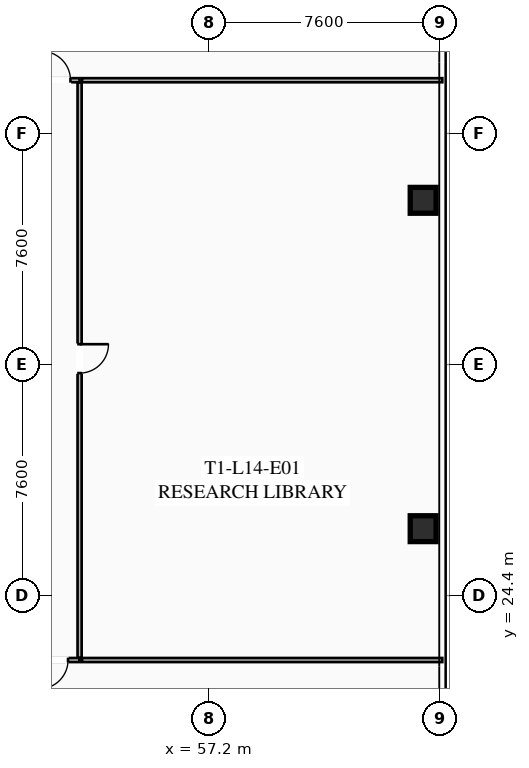
"""IFC4 building model, lengths in metres.
Left out: names, types, materials, properties, quantities, classifications, styles, units other than length and angle.
Written with IfcOpenShell. Run it as: python <this file> out.ifc"""

import sys

from ifc_helpers import new_model, si_unit, direction, frame, frame_2d, origin, origin_2d, place, context, subcontext, project, spatial, rectangle, hollow_rectangle, extrude, element, fill, save


model = new_model("IFC4")
c1 = context("Model", 3, precision=1e-05, world=origin(), true_north=direction((0.0, 1.0)))
c2 = subcontext(c1, "Body", "Model", "MODEL_VIEW")
j1 = project(units=[si_unit("LENGTHUNIT", "METRE"), si_unit("PLANEANGLEUNIT", "RADIAN")], contexts=[c1])
p1 = place(None, origin())
s1 = spatial("IfcSite", under=j1, at=p1, CompositionType="ELEMENT")
p2 = place(p1, origin())
s2 = spatial("IfcBuilding", under=s1, at=p2, CompositionType="ELEMENT")
p3 = place(p2, frame((0.0, 0.0, 56.55)))
s3 = spatial("IfcBuildingStorey", under=s2, at=p3, CompositionType="ELEMENT", Elevation=56.55)
for number, where, z_axis, x_axis in (
    (1, (64.25, 26.6, 0.0), (0.0, 0.0, 1.0), (1.0, 0.0, 0.0)),
    (2, (64.25, 37.4, 0.0), (0.0, 0.0, 1.0), (1.0, 0.0, 0.0)),
):
    element("IfcColumn", number, at=place(p3, frame(where, z_axis=z_axis, x_axis=x_axis)), inside=s3, PredefinedType="COLUMN", context=c2, shape_type="SweptSolid", body=[
        extrude(hollow_rectangle(XDim=0.85, YDim=0.85, WallThickness=0.035, at=origin_2d()), origin(), (0.0, 0.0, 1.0), 3.35),
    ])
p4 = place(p3, frame((22.35, 41.35, 0.0), z_axis=(0.0, 0.0, 1.0), x_axis=(1.0, 0.0, 0.0)))
e3 = element("IfcWall", 3, at=p4, inside=s3, PredefinedType="PARTITIONING", context=c2, shape_type="SweptSolid", body=[
    extrude(rectangle(XDim=30.6, YDim=0.135, at=frame_2d((15.3, 0.0))), origin(), (0.0, 0.0, 1.0), 2.703),
])
p5 = place(p4, frame((0.3, 0.0, 0.0)))
e4 = element("IfcOpeningElement", 4, at=p5, cuts=e3, PredefinedType="OPENING", context=c2, shape_type="SweptSolid", body=[
    extrude(rectangle(XDim=0.95, YDim=2.05, at=frame_2d((0.475, 1.025))), frame((0.0, 0.077, 0.0), z_axis=(0.0, -1.0, 0.0), x_axis=(1.0, 0.0, 0.0)), (0.0, 0.0, 1.0), 0.155),
])
p6 = place(p4, frame((15.12, 0.0, 0.0)))
e5 = element("IfcOpeningElement", 5, at=p6, cuts=e3, PredefinedType="OPENING", context=c2, shape_type="SweptSolid", body=[
    extrude(rectangle(XDim=0.95, YDim=2.05, at=frame_2d((0.475, 1.025))), frame((0.0, 0.077, 0.0), z_axis=(0.0, -1.0, 0.0), x_axis=(1.0, 0.0, 0.0)), (0.0, 0.0, 1.0), 0.155),
])
p7 = place(p4, frame((19.423, 0.0, 0.0)))
e6 = element("IfcOpeningElement", 6, at=p7, cuts=e3, PredefinedType="OPENING", context=c2, shape_type="SweptSolid", body=[
    extrude(rectangle(XDim=0.95, YDim=2.05, at=frame_2d((0.475, 1.025))), frame((0.0, 0.077, 0.0), z_axis=(0.0, -1.0, 0.0), x_axis=(1.0, 0.0, 0.0)), (0.0, 0.0, 1.0), 0.155),
])
p8 = place(p4, frame((23.228, 0.0, 0.0)))
e7 = element("IfcOpeningElement", 7, at=p8, cuts=e3, PredefinedType="OPENING", context=c2, shape_type="SweptSolid", body=[
    extrude(rectangle(XDim=0.95, YDim=2.05, at=frame_2d((0.475, 1.025))), frame((0.0, 0.077, 0.0), z_axis=(0.0, -1.0, 0.0), x_axis=(1.0, 0.0, 0.0)), (0.0, 0.0, 1.0), 0.155),
])
p9 = place(p4, frame((29.35, 0.0, 0.0)))
e8 = element("IfcOpeningElement", 8, at=p9, cuts=e3, PredefinedType="OPENING", context=c2, shape_type="SweptSolid", body=[
    extrude(rectangle(XDim=0.95, YDim=2.05, at=frame_2d((0.475, 1.025))), frame((0.0, 0.077, 0.0), z_axis=(0.0, -1.0, 0.0), x_axis=(1.0, 0.0, 0.0)), (0.0, 0.0, 1.0), 0.155),
])
p10 = place(p3, frame((52.95, 22.28, 0.0), z_axis=(0.0, 0.0, 1.0), x_axis=(-1.0, 0.0, 0.0)))
e9 = element("IfcWall", 9, at=p10, inside=s3, PredefinedType="PARTITIONING", context=c2, shape_type="SweptSolid", body=[
    extrude(rectangle(XDim=30.6, YDim=0.135, at=frame_2d((15.3, 0.0))), origin(), (0.0, 0.0, 1.0), 2.703),
])
p11 = place(p10, frame((29.27, 0.0, 0.0)))
e10 = element("IfcOpeningElement", 10, at=p11, cuts=e9, PredefinedType="OPENING", context=c2, shape_type="SweptSolid", body=[
    extrude(rectangle(XDim=0.95, YDim=2.05, at=frame_2d((0.475, 1.025))), frame((0.0, 0.077, 0.0), z_axis=(0.0, -1.0, 0.0), x_axis=(1.0, 0.0, 0.0)), (0.0, 0.0, 1.0), 0.155),
])
p12 = place(p10, frame((10.268, 0.0, 0.0)))
e11 = element("IfcOpeningElement", 11, at=p12, cuts=e9, PredefinedType="OPENING", context=c2, shape_type="SweptSolid", body=[
    extrude(rectangle(XDim=0.95, YDim=2.05, at=frame_2d((0.475, 1.025))), frame((0.0, 0.077, 0.0), z_axis=(0.0, -1.0, 0.0), x_axis=(1.0, 0.0, 0.0)), (0.0, 0.0, 1.0), 0.155),
])
p13 = place(p10, frame((0.38, 0.0, 0.0)))
e12 = element("IfcOpeningElement", 12, at=p13, cuts=e9, PredefinedType="OPENING", context=c2, shape_type="SweptSolid", body=[
    extrude(rectangle(XDim=0.95, YDim=2.05, at=frame_2d((0.475, 1.025))), frame((0.0, 0.077, 0.0), z_axis=(0.0, -1.0, 0.0), x_axis=(1.0, 0.0, 0.0)), (0.0, 0.0, 1.0), 0.155),
])
p14 = place(p3, frame((52.95, 41.27, 0.0), z_axis=(0.0, 0.0, 1.0), x_axis=(0.0, -1.0, 0.0)))
e13 = element("IfcWall", 13, at=p14, inside=s3, PredefinedType="PARTITIONING", context=c2, shape_type="SweptSolid", body=[
    extrude(rectangle(XDim=18.91, YDim=0.135, at=frame_2d((9.455, 0.0))), origin(), (0.0, 0.0, 1.0), 2.703),
])
p15 = place(p14, frame((8.603, 0.0, 0.0)))
e14 = element("IfcOpeningElement", 14, at=p15, cuts=e13, PredefinedType="OPENING", context=c2, shape_type="SweptSolid", body=[
    extrude(rectangle(XDim=0.95, YDim=2.05, at=frame_2d((0.475, 1.025))), frame((0.0, 0.077, 0.0), z_axis=(0.0, -1.0, 0.0), x_axis=(1.0, 0.0, 0.0)), (0.0, 0.0, 1.0), 0.155),
])
for number, where, z_axis, x_axis in (
    (15, (64.88, 41.35, 0.0), (0.0, 0.0, 1.0), (-1.0, 0.0, 0.0)),
    (16, (53.03, 22.28, 0.0), (0.0, 0.0, 1.0), (1.0, 0.0, 0.0)),
):
    element("IfcWall", number, at=place(p3, frame(where, z_axis=z_axis, x_axis=x_axis)), inside=s3, PredefinedType="PARTITIONING", context=c2, shape_type="SweptSolid", body=[
        extrude(rectangle(XDim=11.85, YDim=0.135, at=frame_2d((5.925, 0.0))), origin(), (0.0, 0.0, 1.0), 2.703),
    ])
p16 = place(p9, origin())
e17 = element("IfcDoor", 17, at=p16, inside=s3, OperationType="SINGLE_SWING_LEFT", PredefinedType="DOOR", context=c2, shape_type="SweptSolid", body=[
    extrude(rectangle(XDim=0.95, YDim=2.05, at=frame_2d((0.475, 1.025))), frame((0.0, 0.025, 0.0), z_axis=(0.0, -1.0, 0.0), x_axis=(1.0, 0.0, 0.0)), (0.0, 0.0, 1.0), 0.05),
])
fill(e8, e17)
p17 = place(p13, origin())
e18 = element("IfcDoor", 18, at=p17, inside=s3, OperationType="SINGLE_SWING_RIGHT", PredefinedType="DOOR", context=c2, shape_type="SweptSolid", body=[
    extrude(rectangle(XDim=0.95, YDim=2.05, at=frame_2d((0.475, 1.025))), frame((0.0, 0.025, 0.0), z_axis=(0.0, -1.0, 0.0), x_axis=(1.0, 0.0, 0.0)), (0.0, 0.0, 1.0), 0.05),
])
fill(e12, e18)
p18 = place(p15, origin())
e19 = element("IfcDoor", 19, at=p18, inside=s3, OperationType="SINGLE_SWING_LEFT", PredefinedType="DOOR", context=c2, shape_type="SweptSolid", body=[
    extrude(rectangle(XDim=0.95, YDim=2.05, at=frame_2d((0.475, 1.025))), frame((0.0, 0.025, 0.0), z_axis=(0.0, -1.0, 0.0), x_axis=(1.0, 0.0, 0.0)), (0.0, 0.0, 1.0), 0.05),
])
fill(e14, e19)
save(model, sys.argv[1])
